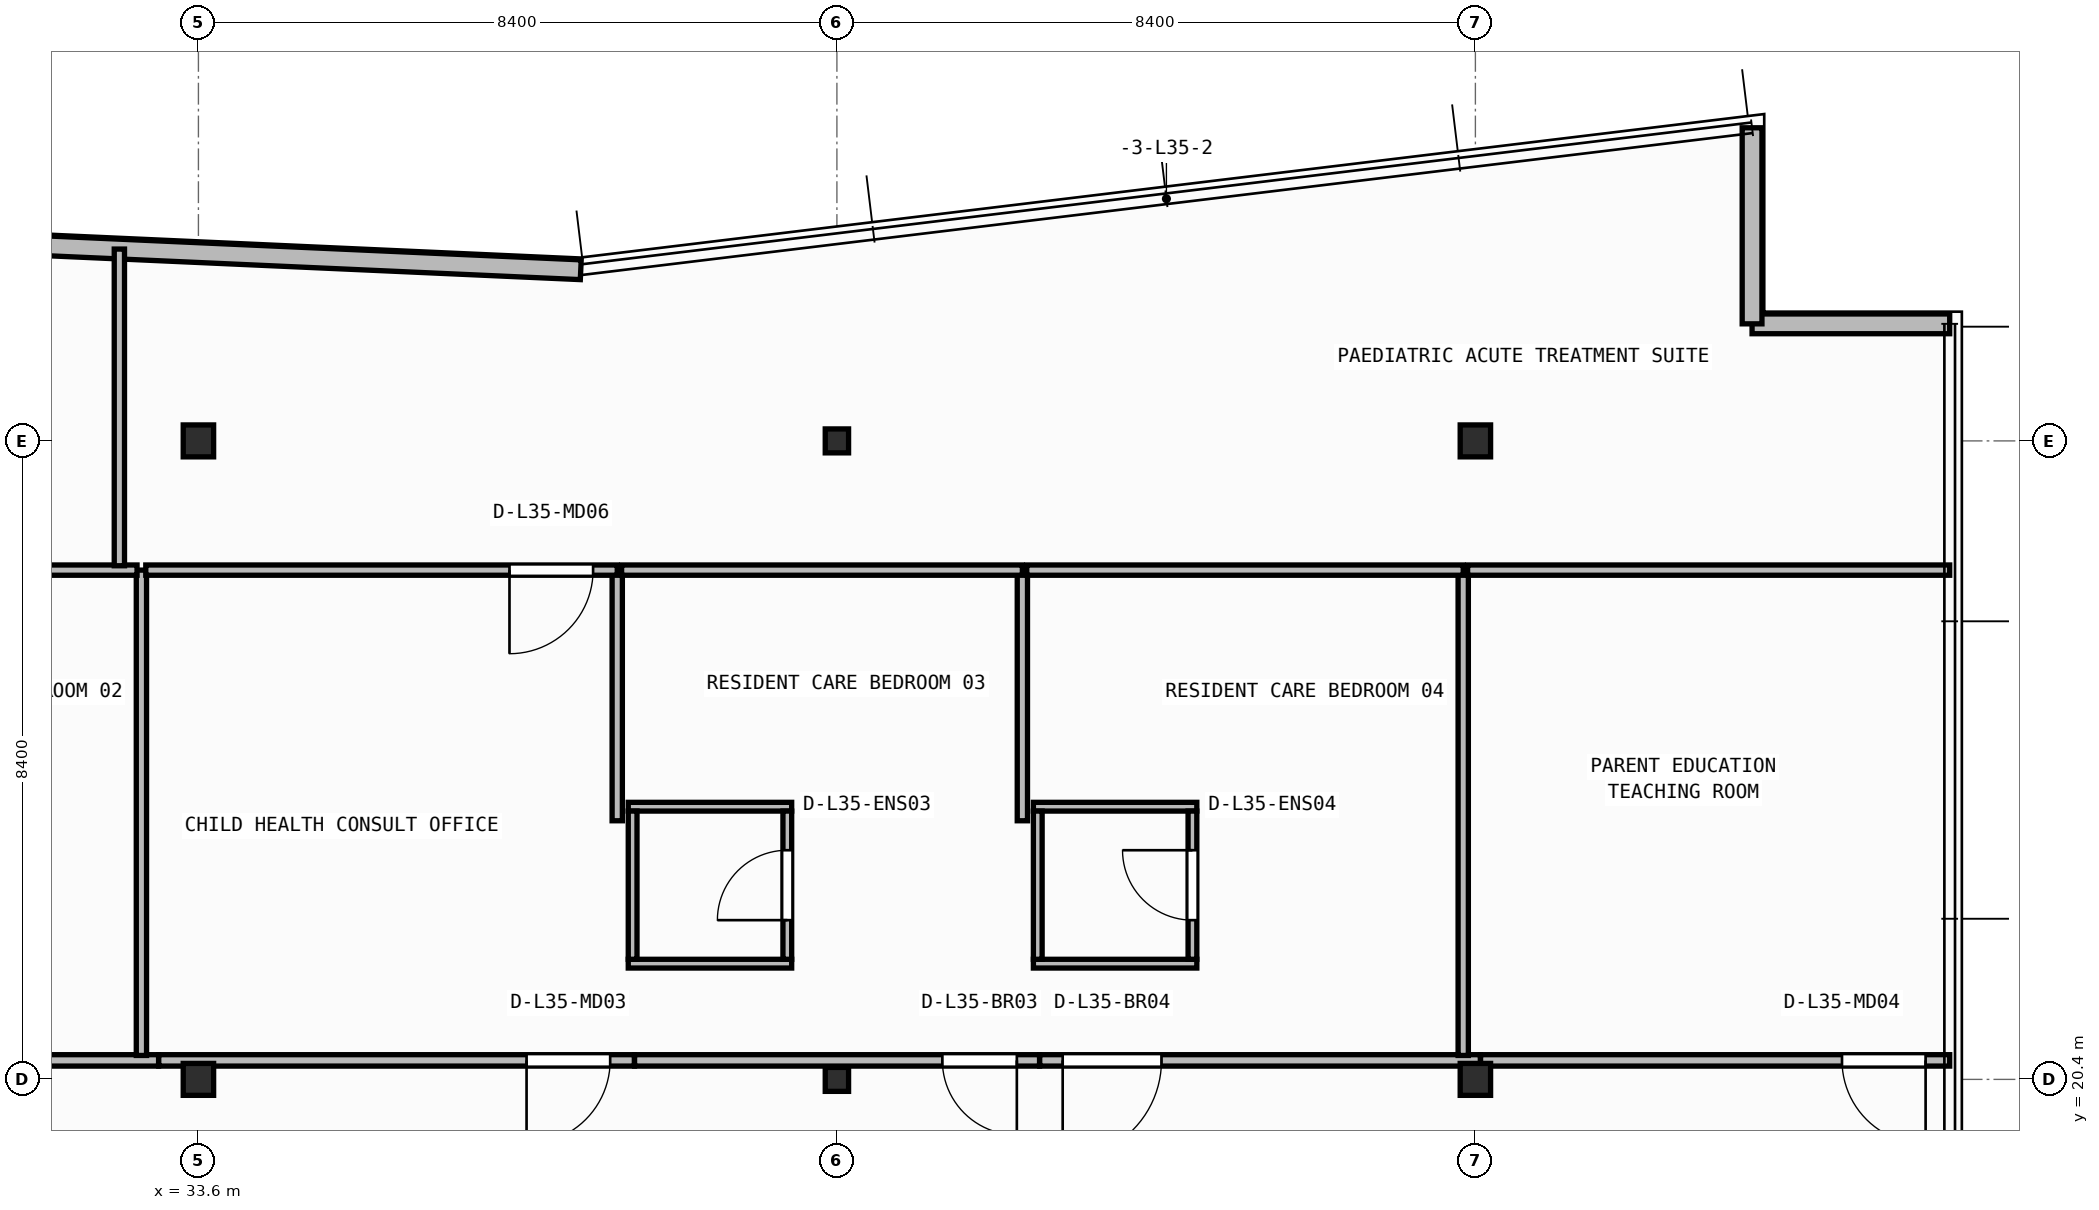
"""IFC4 building model, lengths in metres.
Left out: names, types, materials, properties, quantities, classifications, styles, units other than length and angle.
Written with IfcOpenShell. Run it as: python <this file> out.ifc"""

import sys

from ifc_helpers import new_model, si_unit, direction, frame, frame_2d, origin, origin_2d, place, context, subcontext, project, spatial, rectangle, i_section, extrude, element, fill, save


model = new_model("IFC4")
c1 = context("Model", 3, precision=1e-05, world=origin(), true_north=direction((0.0, 1.0)))
c2 = subcontext(c1, "Body", "Model", "MODEL_VIEW")
j1 = project(units=[si_unit("LENGTHUNIT", "METRE"), si_unit("PLANEANGLEUNIT", "RADIAN")], contexts=[c1])
p1 = place(None, origin())
s1 = spatial("IfcSite", under=j1, at=p1, CompositionType="ELEMENT")
p2 = place(p1, origin())
s2 = spatial("IfcBuilding", under=s1, at=p2, CompositionType="ELEMENT")
p3 = place(p2, frame((0.0, 0.0, 142.85)))
s3 = spatial("IfcBuildingStorey", under=s2, at=p3, CompositionType="ELEMENT", Elevation=142.85)
p4 = place(p3, frame((33.6, 20.4, 0.0), z_axis=(0.0, 0.0, 1.0), x_axis=(1.0, 0.0, 0.0)))
e1 = element("IfcColumn", 1, at=p4, inside=s3, PredefinedType="COLUMN", context=c2, shape_type="SweptSolid", body=[
    extrude(i_section(OverallWidth=0.4, OverallDepth=0.42, WebThickness=0.025, FlangeThickness=0.04, at=origin_2d()), origin(), (0.0, 0.0, 1.0), 3.95),
])
p5 = place(p3, frame((42.0, 20.4, 0.0), z_axis=(0.0, 0.0, 1.0), x_axis=(1.0, 0.0, 0.0)))
e2 = element("IfcColumn", 2, at=p5, inside=s3, PredefinedType="COLUMN", context=c2, shape_type="SweptSolid", body=[
    extrude(i_section(OverallWidth=0.307, OverallDepth=0.315, WebThickness=0.012, FlangeThickness=0.019, FilletRadius=0.017, at=origin_2d()), origin(), (0.0, 0.0, 1.0), 3.95),
])
for number, where, z_axis, x_axis in (
    (3, (50.4, 20.4, 0.0), (0.0, 0.0, 1.0), (1.0, 0.0, 0.0)),
    (4, (33.6, 28.8, 0.0), (0.0, 0.0, 1.0), (1.0, 0.0, 0.0)),
):
    element("IfcColumn", number, at=place(p3, frame(where, z_axis=z_axis, x_axis=x_axis)), inside=s3, PredefinedType="COLUMN", context=c2, shape_type="SweptSolid", body=[
        extrude(i_section(OverallWidth=0.4, OverallDepth=0.42, WebThickness=0.025, FlangeThickness=0.04, at=origin_2d()), origin(), (0.0, 0.0, 1.0), 3.95),
    ])
p6 = place(p3, frame((42.0, 28.8, 0.0), z_axis=(0.0, 0.0, 1.0), x_axis=(1.0, 0.0, 0.0)))
e5 = element("IfcColumn", 5, at=p6, inside=s3, PredefinedType="COLUMN", context=c2, shape_type="SweptSolid", body=[
    extrude(i_section(OverallWidth=0.307, OverallDepth=0.315, WebThickness=0.012, FlangeThickness=0.019, FilletRadius=0.017, at=origin_2d()), origin(), (0.0, 0.0, 1.0), 3.95),
])
p7 = place(p3, frame((50.4, 28.8, 0.0), z_axis=(0.0, 0.0, 1.0), x_axis=(1.0, 0.0, 0.0)))
e6 = element("IfcColumn", 6, at=p7, inside=s3, PredefinedType="COLUMN", context=c2, shape_type="SweptSolid", body=[
    extrude(i_section(OverallWidth=0.4, OverallDepth=0.42, WebThickness=0.025, FlangeThickness=0.04, at=origin_2d()), origin(), (0.0, 0.0, 1.0), 3.95),
])
p8 = place(p3, frame((56.64, 30.34, 0.0), z_axis=(0.0, 0.0, 1.0), x_axis=(-1.0, 0.0, 0.0)))
e7 = element("IfcWall", 7, at=p8, inside=s3, PredefinedType="STANDARD", context=c2, shape_type="SweptSolid", body=[
    extrude(rectangle(XDim=2.6, YDim=0.26, at=frame_2d((1.3, 0.0))), origin(), (0.0, 0.0, 1.0), 3.71),
])
p9 = place(p3, frame((54.04, 30.34, 0.0), z_axis=(0.0, 0.0, 1.0), x_axis=(0.0, 1.0, 0.0)))
e8 = element("IfcWall", 8, at=p9, inside=s3, PredefinedType="STANDARD", context=c2, shape_type="SweptSolid", body=[
    extrude(rectangle(XDim=2.579, YDim=0.26, at=frame_2d((1.29, 0.0))), origin(), (0.0, 0.0, 1.0), 3.71),
])
p10 = place(p3, frame((38.63, 31.052, 0.0), z_axis=(0.0, 0.0, 1.0), x_axis=(-0.998996592956, 0.044786239663, 0.0)))
e9 = element("IfcWall", 9, at=p10, inside=s3, PredefinedType="STANDARD", context=c2, shape_type="SweptSolid", body=[
    extrude(rectangle(XDim=14.827, YDim=0.26, at=frame_2d((7.414, 0.0))), origin(), (0.0, 0.0, 1.0), 3.71),
])
p11 = place(p10, frame((9.262, 0.0, 0.9)))
e10 = element("IfcOpeningElement", 10, at=p11, cuts=e9, PredefinedType="OPENING", context=c2, shape_type="SweptSolid", body=[
    extrude(rectangle(XDim=2.4, YDim=1.65, at=frame_2d((1.2, 0.825))), frame((0.0, 0.14, 0.0), z_axis=(0.0, -1.0, 0.0), x_axis=(1.0, 0.0, 0.0)), (0.0, 0.0, 1.0), 0.28),
])
for number, where, z_axis, x_axis in (
    (11, (39.255, 21.923, 0.0), (0.0, 0.0, 1.0), (1.0, 0.0, 0.0)),
    (12, (39.255, 23.988, 0.0), (0.0, 0.0, 1.0), (1.0, 0.0, 0.0)),
):
    element("IfcWall", number, at=place(p3, frame(where, z_axis=z_axis, x_axis=x_axis)), inside=s3, PredefinedType="PARTITIONING", context=c2, shape_type="SweptSolid", body=[
        extrude(rectangle(XDim=2.15, YDim=0.115, at=frame_2d((1.075, 0.0))), origin(), (0.0, 0.0, 1.0), 3.71),
    ])
p12 = place(p3, frame((39.312, 21.98, 0.0), z_axis=(0.0, 0.0, 1.0), x_axis=(0.0, 1.0, 0.0)))
e13 = element("IfcWall", 13, at=p12, inside=s3, PredefinedType="PARTITIONING", context=c2, shape_type="SweptSolid", body=[
    extrude(rectangle(XDim=1.95, YDim=0.115, at=frame_2d((0.975, 0.0))), origin(), (0.0, 0.0, 1.0), 3.71),
])
p13 = place(p3, frame((41.347, 21.98, 0.0), z_axis=(0.0, 0.0, 1.0), x_axis=(0.0, 1.0, 0.0)))
e14 = element("IfcWall", 14, at=p13, inside=s3, PredefinedType="PARTITIONING", context=c2, shape_type="SweptSolid", body=[
    extrude(rectangle(XDim=1.95, YDim=0.115, at=frame_2d((0.975, 0.0))), origin(), (0.0, 0.0, 1.0), 3.71),
])
p14 = place(p13, frame((0.515, 0.0, 0.0)))
e15 = element("IfcOpeningElement", 15, at=p14, cuts=e14, PredefinedType="OPENING", context=c2, shape_type="SweptSolid", body=[
    extrude(rectangle(XDim=0.92, YDim=2.1, at=frame_2d((0.46, 1.05))), frame((0.0, 0.067, 0.0), z_axis=(0.0, -1.0, 0.0), x_axis=(1.0, 0.0, 0.0)), (0.0, 0.0, 1.0), 0.135),
])
for number, where, z_axis, x_axis in (
    (16, (44.585, 21.923, 0.0), (0.0, 0.0, 1.0), (1.0, 0.0, 0.0)),
    (17, (44.585, 23.988, 0.0), (0.0, 0.0, 1.0), (1.0, 0.0, 0.0)),
):
    element("IfcWall", number, at=place(p3, frame(where, z_axis=z_axis, x_axis=x_axis)), inside=s3, PredefinedType="PARTITIONING", context=c2, shape_type="SweptSolid", body=[
        extrude(rectangle(XDim=2.15, YDim=0.115, at=frame_2d((1.075, 0.0))), origin(), (0.0, 0.0, 1.0), 3.71),
    ])
p15 = place(p3, frame((44.643, 21.98, 0.0), z_axis=(0.0, 0.0, 1.0), x_axis=(0.0, 1.0, 0.0)))
e18 = element("IfcWall", 18, at=p15, inside=s3, PredefinedType="PARTITIONING", context=c2, shape_type="SweptSolid", body=[
    extrude(rectangle(XDim=1.95, YDim=0.115, at=frame_2d((0.975, 0.0))), origin(), (0.0, 0.0, 1.0), 3.71),
])
p16 = place(p3, frame((46.677, 21.98, 0.0), z_axis=(0.0, 0.0, 1.0), x_axis=(0.0, 1.0, 0.0)))
e19 = element("IfcWall", 19, at=p16, inside=s3, PredefinedType="PARTITIONING", context=c2, shape_type="SweptSolid", body=[
    extrude(rectangle(XDim=1.95, YDim=0.115, at=frame_2d((0.975, 0.0))), origin(), (0.0, 0.0, 1.0), 3.71),
])
p17 = place(p16, frame((0.515, 0.0, 0.0)))
e20 = element("IfcOpeningElement", 20, at=p17, cuts=e19, PredefinedType="OPENING", context=c2, shape_type="SweptSolid", body=[
    extrude(rectangle(XDim=0.92, YDim=2.1, at=frame_2d((0.46, 1.05))), frame((0.0, 0.067, 0.0), z_axis=(0.0, -1.0, 0.0), x_axis=(1.0, 0.0, 0.0)), (0.0, 0.0, 1.0), 0.135),
])
p18 = place(p3, frame((33.076, 20.65, 0.0), z_axis=(0.0, 0.0, 1.0), x_axis=(-1.0, 0.0, 0.0)))
e21 = element("IfcWall", 21, at=p18, inside=s3, PredefinedType="PARTITIONING", context=c2, shape_type="SweptSolid", body=[
    extrude(rectangle(XDim=5.798, YDim=0.15, at=frame_2d((2.899, 0.0))), origin(), (0.0, 0.0, 1.0), 3.083),
])
p19 = place(p18, frame((3.069, 0.0, 0.0)))
e22 = element("IfcOpeningElement", 22, at=p19, cuts=e21, PredefinedType="OPENING", context=c2, shape_type="SweptSolid", body=[
    extrude(rectangle(XDim=1.3, YDim=2.15, at=frame_2d((0.65, 1.075))), frame((0.0, 0.085, 0.0), z_axis=(0.0, -1.0, 0.0), x_axis=(1.0, 0.0, 0.0)), (0.0, 0.0, 1.0), 0.17),
])
p20 = place(p3, frame((39.336, 20.65, 0.0), z_axis=(0.0, 0.0, 1.0), x_axis=(-1.0, 0.0, 0.0)))
e23 = element("IfcWall", 23, at=p20, inside=s3, PredefinedType="PARTITIONING", context=c2, shape_type="SweptSolid", body=[
    extrude(rectangle(XDim=6.258, YDim=0.15, at=frame_2d((3.129, 0.0))), origin(), (0.0, 0.0, 1.0), 3.083),
])
p21 = place(p20, frame((0.319, 0.0, 0.0)))
e24 = element("IfcOpeningElement", 24, at=p21, cuts=e23, PredefinedType="OPENING", context=c2, shape_type="SweptSolid", body=[
    extrude(rectangle(XDim=1.1, YDim=2.1, at=frame_2d((0.55, 1.05))), frame((0.0, 0.085, 0.0), z_axis=(0.0, -1.0, 0.0), x_axis=(1.0, 0.0, 0.0)), (0.0, 0.0, 1.0), 0.17),
])
p22 = place(p3, frame((44.666, 20.65, 0.0), z_axis=(0.0, 0.0, 1.0), x_axis=(-1.0, 0.0, 0.0)))
e25 = element("IfcWall", 25, at=p22, inside=s3, PredefinedType="PARTITIONING", context=c2, shape_type="SweptSolid", body=[
    extrude(rectangle(XDim=5.328, YDim=0.15, at=frame_2d((2.664, 0.0))), origin(), (0.0, 0.0, 1.0), 3.083),
])
p23 = place(p22, frame((0.299, 0.0, 0.0)))
e26 = element("IfcOpeningElement", 26, at=p23, cuts=e25, PredefinedType="OPENING", context=c2, shape_type="SweptSolid", body=[
    extrude(rectangle(XDim=0.98, YDim=2.1, at=frame_2d((0.49, 1.05))), frame((0.0, 0.085, 0.0), z_axis=(0.0, -1.0, 0.0), x_axis=(1.0, 0.0, 0.0)), (0.0, 0.0, 1.0), 0.17),
])
p24 = place(p3, frame((50.466, 20.65, 0.0), z_axis=(0.0, 0.0, 1.0), x_axis=(-1.0, 0.0, 0.0)))
e27 = element("IfcWall", 27, at=p24, inside=s3, PredefinedType="PARTITIONING", context=c2, shape_type="SweptSolid", body=[
    extrude(rectangle(XDim=5.798, YDim=0.15, at=frame_2d((2.899, 0.0))), origin(), (0.0, 0.0, 1.0), 3.083),
])
p25 = place(p24, frame((4.196, 0.0, 0.0)))
e28 = element("IfcOpeningElement", 28, at=p25, cuts=e27, PredefinedType="OPENING", context=c2, shape_type="SweptSolid", body=[
    extrude(rectangle(XDim=1.3, YDim=2.15, at=frame_2d((0.65, 1.075))), frame((0.0, 0.085, 0.0), z_axis=(0.0, -1.0, 0.0), x_axis=(1.0, 0.0, 0.0)), (0.0, 0.0, 1.0), 0.17),
])
p26 = place(p3, frame((56.64, 20.65, 0.0), z_axis=(0.0, 0.0, 1.0), x_axis=(-1.0, 0.0, 0.0)))
e29 = element("IfcWall", 29, at=p26, inside=s3, PredefinedType="PARTITIONING", context=c2, shape_type="SweptSolid", body=[
    extrude(rectangle(XDim=6.172, YDim=0.15, at=frame_2d((3.086, 0.0))), origin(), (0.0, 0.0, 1.0), 3.71),
])
p27 = place(p26, frame((0.317, 0.0, 0.0)))
e30 = element("IfcOpeningElement", 30, at=p27, cuts=e29, PredefinedType="OPENING", context=c2, shape_type="SweptSolid", body=[
    extrude(rectangle(XDim=1.1, YDim=2.1, at=frame_2d((0.55, 1.05))), frame((0.0, 0.085, 0.0), z_axis=(0.0, -1.0, 0.0), x_axis=(1.0, 0.0, 0.0)), (0.0, 0.0, 1.0), 0.17),
])
p28 = place(p3, frame((32.85, 20.715, 0.0), z_axis=(0.0, 0.0, 1.0), x_axis=(0.0, 1.0, 0.0)))
e31 = element("IfcWall", 31, at=p28, inside=s3, PredefinedType="PARTITIONING", context=c2, shape_type="SweptSolid", body=[
    extrude(rectangle(XDim=6.385, YDim=0.135, at=frame_2d((3.192, 0.0))), origin(), (0.0, 0.0, 1.0), 3.71),
])
p29 = place(p3, frame((32.792, 27.1, 0.0), z_axis=(0.0, 0.0, 1.0), x_axis=(-1.0, 0.0, 0.0)))
e32 = element("IfcWall", 32, at=p29, inside=s3, PredefinedType="PARTITIONING", context=c2, shape_type="SweptSolid", body=[
    extrude(rectangle(XDim=5.685, YDim=0.135, at=frame_2d((2.843, 0.0))), origin(), (0.0, 0.0, 1.0), 3.71),
])
p30 = place(p3, frame((39.11, 23.802, 0.0), z_axis=(0.0, 0.0, 1.0), x_axis=(0.0, 1.0, 0.0)))
e33 = element("IfcWall", 33, at=p30, inside=s3, PredefinedType="PARTITIONING", context=c2, shape_type="SweptSolid", body=[
    extrude(rectangle(XDim=3.298, YDim=0.135, at=frame_2d((1.649, 0.0))), origin(), (0.0, 0.0, 1.0), 3.71),
])
p31 = place(p3, frame((39.11, 27.1, 0.0), z_axis=(0.0, 0.0, 1.0), x_axis=(-1.0, 0.0, 0.0)))
e34 = element("IfcWall", 34, at=p31, inside=s3, PredefinedType="PARTITIONING", context=c2, shape_type="SweptSolid", body=[
    extrude(rectangle(XDim=6.203, YDim=0.135, at=frame_2d((3.101, 0.0))), origin(), (0.0, 0.0, 1.0), 3.71),
])
p32 = place(p31, frame((0.318, 0.0, 0.0)))
e35 = element("IfcOpeningElement", 35, at=p32, cuts=e34, PredefinedType="OPENING", context=c2, shape_type="SweptSolid", body=[
    extrude(rectangle(XDim=1.1, YDim=2.1, at=frame_2d((0.55, 1.05))), frame((0.0, 0.077, 0.0), z_axis=(0.0, -1.0, 0.0), x_axis=(1.0, 0.0, 0.0)), (0.0, 0.0, 1.0), 0.155),
])
p33 = place(p3, frame((44.44, 23.802, 0.0), z_axis=(0.0, 0.0, 1.0), x_axis=(0.0, 1.0, 0.0)))
e36 = element("IfcWall", 36, at=p33, inside=s3, PredefinedType="PARTITIONING", context=c2, shape_type="SweptSolid", body=[
    extrude(rectangle(XDim=3.298, YDim=0.135, at=frame_2d((1.649, 0.0))), origin(), (0.0, 0.0, 1.0), 3.71),
])
p34 = place(p3, frame((44.44, 27.1, 0.0), z_axis=(0.0, 0.0, 1.0), x_axis=(-1.0, 0.0, 0.0)))
e37 = element("IfcWall", 37, at=p34, inside=s3, PredefinedType="PARTITIONING", context=c2, shape_type="SweptSolid", body=[
    extrude(rectangle(XDim=5.272, YDim=0.135, at=frame_2d((2.636, 0.0))), origin(), (0.0, 0.0, 1.0), 3.71),
])
p35 = place(p3, frame((50.24, 20.715, 0.0), z_axis=(0.0, 0.0, 1.0), x_axis=(0.0, 1.0, 0.0)))
e38 = element("IfcWall", 38, at=p35, inside=s3, PredefinedType="PARTITIONING", context=c2, shape_type="SweptSolid", body=[
    extrude(rectangle(XDim=6.385, YDim=0.135, at=frame_2d((3.192, 0.0))), origin(), (0.0, 0.0, 1.0), 3.152),
])
p36 = place(p3, frame((50.24, 27.1, 0.0), z_axis=(0.0, 0.0, 1.0), x_axis=(-1.0, 0.0, 0.0)))
e39 = element("IfcWall", 39, at=p36, inside=s3, PredefinedType="PARTITIONING", context=c2, shape_type="SweptSolid", body=[
    extrude(rectangle(XDim=5.742, YDim=0.135, at=frame_2d((2.871, 0.0))), origin(), (0.0, 0.0, 1.0), 3.71),
])
p37 = place(p3, frame((56.64, 27.1, 0.0), z_axis=(0.0, 0.0, 1.0), x_axis=(-1.0, 0.0, 0.0)))
e40 = element("IfcWall", 40, at=p37, inside=s3, PredefinedType="PARTITIONING", context=c2, shape_type="SweptSolid", body=[
    extrude(rectangle(XDim=6.342, YDim=0.135, at=frame_2d((3.171, 0.0))), origin(), (0.0, 0.0, 1.0), 3.71),
])
p38 = place(p3, frame((32.56, 27.157, 0.0), z_axis=(0.0, 0.0, 1.0), x_axis=(0.0, 1.0, 0.0)))
e41 = element("IfcWall", 41, at=p38, inside=s3, PredefinedType="PARTITIONING", context=c2, shape_type="SweptSolid", body=[
    extrude(rectangle(XDim=4.166, YDim=0.135, at=frame_2d((2.083, 0.0))), origin(), (0.0, 0.0, 1.0), 3.71),
])
p39 = place(p14, origin())
e42 = element("IfcDoor", 42, at=p39, inside=s3, OperationType="SINGLE_SWING_LEFT", PredefinedType="DOOR", context=c2, shape_type="SweptSolid", body=[
    extrude(rectangle(XDim=0.92, YDim=2.1, at=frame_2d((0.46, 1.05))), frame((0.0, 0.025, 0.0), z_axis=(0.0, -1.0, 0.0), x_axis=(1.0, 0.0, 0.0)), (0.0, 0.0, 1.0), 0.05),
])
fill(e15, e42)
p40 = place(p17, origin())
e43 = element("IfcDoor", 43, at=p40, inside=s3, OperationType="SINGLE_SWING_RIGHT", PredefinedType="DOOR", context=c2, shape_type="SweptSolid", body=[
    extrude(rectangle(XDim=0.92, YDim=2.1, at=frame_2d((0.46, 1.05))), frame((0.0, 0.025, 0.0), z_axis=(0.0, -1.0, 0.0), x_axis=(1.0, 0.0, 0.0)), (0.0, 0.0, 1.0), 0.05),
])
fill(e20, e43)
p41 = place(p21, origin())
e44 = element("IfcDoor", 44, at=p41, inside=s3, OperationType="SINGLE_SWING_RIGHT", PredefinedType="DOOR", context=c2, shape_type="SweptSolid", body=[
    extrude(rectangle(XDim=1.1, YDim=2.1, at=frame_2d((0.55, 1.05))), frame((0.0, 0.025, 0.0), z_axis=(0.0, -1.0, 0.0), x_axis=(1.0, 0.0, 0.0)), (0.0, 0.0, 1.0), 0.05),
])
fill(e24, e44)
p42 = place(p23, origin())
e45 = element("IfcDoor", 45, at=p42, inside=s3, OperationType="SINGLE_SWING_LEFT", PredefinedType="DOOR", context=c2, shape_type="SweptSolid", body=[
    extrude(rectangle(XDim=0.98, YDim=2.1, at=frame_2d((0.49, 1.05))), frame((0.0, 0.025, 0.0), z_axis=(0.0, -1.0, 0.0), x_axis=(1.0, 0.0, 0.0)), (0.0, 0.0, 1.0), 0.05),
])
fill(e26, e45)
p43 = place(p25, origin())
e46 = element("IfcDoor", 46, at=p43, inside=s3, OperationType="SINGLE_SWING_RIGHT", PredefinedType="DOOR", context=c2, shape_type="SweptSolid", body=[
    extrude(rectangle(XDim=1.3, YDim=2.15, at=frame_2d((0.65, 1.075))), frame((0.0, 0.025, 0.0), z_axis=(0.0, -1.0, 0.0), x_axis=(1.0, 0.0, 0.0)), (0.0, 0.0, 1.0), 0.05),
])
fill(e28, e46)
p44 = place(p27, origin())
e47 = element("IfcDoor", 47, at=p44, inside=s3, OperationType="SINGLE_SWING_LEFT", PredefinedType="DOOR", context=c2, shape_type="SweptSolid", body=[
    extrude(rectangle(XDim=1.1, YDim=2.1, at=frame_2d((0.55, 1.05))), frame((0.0, 0.025, 0.0), z_axis=(0.0, -1.0, 0.0), x_axis=(1.0, 0.0, 0.0)), (0.0, 0.0, 1.0), 0.05),
])
fill(e30, e47)
p45 = place(p32, origin())
e48 = element("IfcDoor", 48, at=p45, inside=s3, OperationType="SINGLE_SWING_RIGHT", PredefinedType="DOOR", context=c2, shape_type="SweptSolid", body=[
    extrude(rectangle(XDim=1.1, YDim=2.1, at=frame_2d((0.55, 1.05))), frame((0.0, 0.025, 0.0), z_axis=(0.0, -1.0, 0.0), x_axis=(1.0, 0.0, 0.0)), (0.0, 0.0, 1.0), 0.05),
])
fill(e35, e48)
save(model, sys.argv[1])
